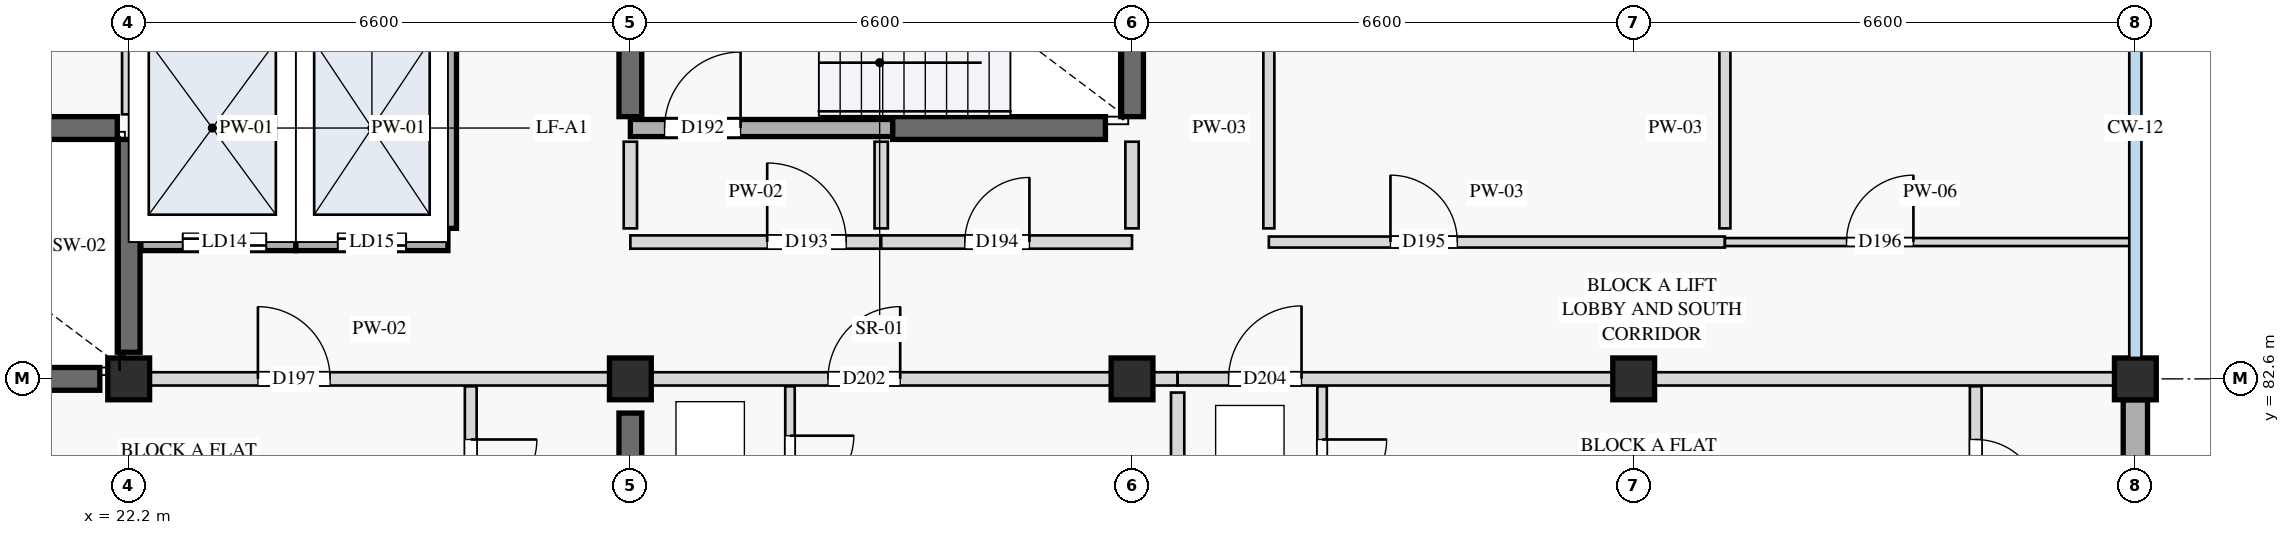
"""IFC4 building model, lengths in metres.
Left out: names, types, materials, properties, quantities, classifications, styles, units other than length and angle.
Written with IfcOpenShell. Run it as: python <this file> out.ifc"""

import sys

from ifc_helpers import new_model, si_unit, direction, frame, frame_2d, origin, origin_2d, place, context, subcontext, project, spatial, rectangle, extrude, element, fill, save


model = new_model("IFC4")
c1 = context("Model", 3, precision=1e-05, world=origin(), true_north=direction((0.0, 1.0)))
c2 = subcontext(c1, "Body", "Model", "MODEL_VIEW")
j1 = project(units=[si_unit("LENGTHUNIT", "METRE"), si_unit("PLANEANGLEUNIT", "RADIAN")], contexts=[c1])
p1 = place(None, origin())
s1 = spatial("IfcSite", under=j1, at=p1, CompositionType="ELEMENT")
p2 = place(p1, origin())
s2 = spatial("IfcBuilding", under=s1, at=p2, CompositionType="ELEMENT")
p3 = place(p2, frame((0.0, 0.0, 21.2)))
s3 = spatial("IfcBuildingStorey", under=s2, at=p3, CompositionType="ELEMENT", Elevation=21.2)
for number, where, z_axis, x_axis in (
    (1, (22.2, 82.6, 0.0), (0.0, 0.0, 1.0), (1.0, 0.0, 0.0)),
    (2, (28.8, 82.6, 0.0), (0.0, 0.0, 1.0), (1.0, 0.0, 0.0)),
    (3, (35.4, 82.6, 0.0), (0.0, 0.0, 1.0), (1.0, 0.0, 0.0)),
    (4, (42.0, 82.6, 0.0), (0.0, 0.0, 1.0), (1.0, 0.0, 0.0)),
    (5, (48.6, 82.6, 0.0), (0.0, 0.0, 1.0), (1.0, 0.0, 0.0)),
):
    element("IfcColumn", number, at=place(p3, frame(where, z_axis=z_axis, x_axis=x_axis)), inside=s3, PredefinedType="COLUMN", context=c2, shape_type="SweptSolid", body=[
        extrude(rectangle(XDim=0.55, YDim=0.55, at=origin_2d()), origin(), (0.0, 0.0, 1.0), 3.2),
    ])
p4 = place(p3, frame((15.98, 82.6, 0.0), z_axis=(0.0, 0.0, 1.0), x_axis=(1.0, 0.0, 0.0)))
e6 = element("IfcWall", 6, at=p4, inside=s3, PredefinedType="SHEAR", context=c2, shape_type="SweptSolid", body=[
    extrude(rectangle(XDim=5.84, YDim=0.3, at=frame_2d((2.92, 0.0))), origin(), (0.0, 0.0, 1.0), 2.96),
])
p5 = place(p3, frame((19.35, 85.9, 0.0), z_axis=(0.0, 0.0, 1.0), x_axis=(1.0, 0.0, 0.0)))
e7 = element("IfcWall", 7, at=p5, inside=s3, PredefinedType="SHEAR", context=c2, shape_type="SweptSolid", body=[
    extrude(rectangle(XDim=2.7, YDim=0.3, at=frame_2d((1.35, 0.0))), origin(), (0.0, 0.0, 1.0), 2.96),
])
for number, where, z_axis, x_axis in (
    (8, (22.2, 82.95, 0.0), (0.0, 0.0, 1.0), (0.0, 1.0, 0.0)),
    (9, (32.25, 85.9, 0.0), (0.0, 0.0, 1.0), (1.0, 0.0, 0.0)),
    (10, (28.8, 86.05, 0.0), (0.0, 0.0, 1.0), (0.0, 1.0, 0.0)),
    (11, (35.4, 86.05, 0.0), (0.0, 0.0, 1.0), (0.0, 1.0, 0.0)),
):
    element("IfcWall", number, at=place(p3, frame(where, z_axis=z_axis, x_axis=x_axis)), inside=s3, PredefinedType="SHEAR", context=c2, shape_type="SweptSolid", body=[
        extrude(rectangle(XDim=2.8, YDim=0.3, at=frame_2d((1.4, 0.0))), origin(), (0.0, 0.0, 1.0), 2.96),
    ])
p6 = place(p3, frame((28.8, 76.45, 0.0), z_axis=(0.0, 0.0, 1.0), x_axis=(0.0, 1.0, 0.0)))
e12 = element("IfcWall", 12, at=p6, inside=s3, PredefinedType="SHEAR", context=c2, shape_type="SweptSolid", body=[
    extrude(rectangle(XDim=5.7, YDim=0.3, at=frame_2d((2.85, 0.0))), origin(), (0.0, 0.0, 1.0), 2.96),
])
p7 = place(p3, frame((48.6, 76.275, 0.0), z_axis=(0.0, 0.0, 1.0), x_axis=(0.0, 1.0, 0.0)))
e13 = element("IfcWall", 13, at=p7, inside=s3, PredefinedType="STANDARD", context=c2, shape_type="SweptSolid", body=[
    extrude(rectangle(XDim=6.05, YDim=0.32, at=frame_2d((3.025, 0.0))), origin(), (0.0, 0.0, 1.0), 2.65),
])
p8 = place(p3, frame((22.2, 86.08, 0.0), z_axis=(0.0, 0.0, 1.0), x_axis=(0.0, 1.0, 0.0)))
e14 = element("IfcWall", 14, at=p8, inside=s3, PredefinedType="PARTITIONING", context=c2, shape_type="SweptSolid", body=[
    extrude(rectangle(XDim=1.19, YDim=0.175, at=frame_2d((0.595, 0.0))), origin(), (0.0, 0.0, 1.0), 2.96),
])
p9 = place(p3, frame((22.36, 84.4, 0.0), z_axis=(0.0, 0.0, 1.0), x_axis=(1.0, 0.0, 0.0)))
e15 = element("IfcWall", 15, at=p9, inside=s3, PredefinedType="STANDARD", context=c2, shape_type="SweptSolid", body=[
    extrude(rectangle(XDim=2.04, YDim=0.225, at=frame_2d((1.02, 0.0))), origin(), (0.0, 0.0, 1.0), 2.96),
])
p10 = place(p9, frame((0.55, 0.0, 0.0)))
e16 = element("IfcOpeningElement", 16, at=p10, cuts=e15, PredefinedType="OPENING", context=c2, shape_type="SweptSolid", body=[
    extrude(rectangle(XDim=1.1, YDim=2.1, at=frame_2d((0.55, 1.05))), frame((0.0, 0.123, 0.0), z_axis=(0.0, -1.0, 0.0), x_axis=(1.0, 0.0, 0.0)), (0.0, 0.0, 1.0), 0.245),
])
p11 = place(p3, frame((24.4, 84.4, 0.0), z_axis=(0.0, 0.0, 1.0), x_axis=(1.0, 0.0, 0.0)))
e17 = element("IfcWall", 17, at=p11, inside=s3, PredefinedType="STANDARD", context=c2, shape_type="SweptSolid", body=[
    extrude(rectangle(XDim=2.0, YDim=0.225, at=frame_2d((1.0, 0.0))), origin(), (0.0, 0.0, 1.0), 2.96),
])
p12 = place(p11, frame((0.55, 0.0, 0.0)))
e18 = element("IfcOpeningElement", 18, at=p12, cuts=e17, PredefinedType="OPENING", context=c2, shape_type="SweptSolid", body=[
    extrude(rectangle(XDim=0.9, YDim=2.1, at=frame_2d((0.45, 1.05))), frame((0.0, 0.123, 0.0), z_axis=(0.0, -1.0, 0.0), x_axis=(1.0, 0.0, 0.0)), (0.0, 0.0, 1.0), 0.245),
])
for number, where, z_axis, x_axis in (
    (19, (24.4, 84.58, 0.0), (0.0, 0.0, 1.0), (0.0, 1.0, 0.0)),
    (20, (26.4, 84.58, 0.0), (0.0, 0.0, 1.0), (0.0, 1.0, 0.0)),
):
    element("IfcWall", number, at=place(p3, frame(where, z_axis=z_axis, x_axis=x_axis)), inside=s3, PredefinedType="STANDARD", context=c2, shape_type="SweptSolid", body=[
        extrude(rectangle(XDim=2.64, YDim=0.225, at=frame_2d((1.32, 0.0))), origin(), (0.0, 0.0, 1.0), 2.96),
    ])
p13 = place(p3, frame((28.8, 85.9, 0.0), z_axis=(0.0, 0.0, 1.0), x_axis=(1.0, 0.0, 0.0)))
e21 = element("IfcWall", 21, at=p13, inside=s3, PredefinedType="STANDARD", context=c2, shape_type="SweptSolid", body=[
    extrude(rectangle(XDim=3.45, YDim=0.225, at=frame_2d((1.725, 0.0))), origin(), (0.0, 0.0, 1.0), 2.96),
])
p14 = place(p13, frame((0.45, 0.0, 0.0)))
e22 = element("IfcOpeningElement", 22, at=p14, cuts=e21, PredefinedType="OPENING", context=c2, shape_type="SweptSolid", body=[
    extrude(rectangle(XDim=1.0, YDim=2.16, at=frame_2d((0.5, 1.08))), frame((0.0, 0.123, 0.0), z_axis=(0.0, -1.0, 0.0), x_axis=(1.0, 0.0, 0.0)), (0.0, 0.0, 1.0), 0.245),
])
p15 = place(p3, frame((28.8, 84.4, 0.0), z_axis=(0.0, 0.0, 1.0), x_axis=(1.0, 0.0, 0.0)))
e23 = element("IfcWall", 23, at=p15, inside=s3, PredefinedType="PARTITIONING", context=c2, shape_type="SweptSolid", body=[
    extrude(rectangle(XDim=3.3, YDim=0.175, at=frame_2d((1.65, 0.0))), origin(), (0.0, 0.0, 1.0), 2.96),
])
p16 = place(p15, frame((1.8, 0.0, 0.0)))
e24 = element("IfcOpeningElement", 24, at=p16, cuts=e23, PredefinedType="OPENING", context=c2, shape_type="SweptSolid", body=[
    extrude(rectangle(XDim=1.04, YDim=2.12, at=frame_2d((0.52, 1.06))), frame((0.0, 0.097, 0.0), z_axis=(0.0, -1.0, 0.0), x_axis=(1.0, 0.0, 0.0)), (0.0, 0.0, 1.0), 0.195),
])
p17 = place(p3, frame((32.1, 84.4, 0.0), z_axis=(0.0, 0.0, 1.0), x_axis=(1.0, 0.0, 0.0)))
e25 = element("IfcWall", 25, at=p17, inside=s3, PredefinedType="PARTITIONING", context=c2, shape_type="SweptSolid", body=[
    extrude(rectangle(XDim=3.3, YDim=0.175, at=frame_2d((1.65, 0.0))), origin(), (0.0, 0.0, 1.0), 2.96),
])
p18 = place(p17, frame((1.1, 0.0, 0.0)))
e26 = element("IfcOpeningElement", 26, at=p18, cuts=e25, PredefinedType="OPENING", context=c2, shape_type="SweptSolid", body=[
    extrude(rectangle(XDim=0.85, YDim=2.0, at=frame_2d((0.425, 1.0))), frame((0.0, 0.097, 0.0), z_axis=(0.0, -1.0, 0.0), x_axis=(1.0, 0.0, 0.0)), (0.0, 0.0, 1.0), 0.195),
])
for number, where, z_axis, x_axis in (
    (27, (28.8, 84.58, 0.0), (0.0, 0.0, 1.0), (0.0, 1.0, 0.0)),
    (28, (32.1, 84.58, 0.0), (0.0, 0.0, 1.0), (0.0, 1.0, 0.0)),
    (29, (35.4, 84.58, 0.0), (0.0, 0.0, 1.0), (0.0, 1.0, 0.0)),
):
    element("IfcWall", number, at=place(p3, frame(where, z_axis=z_axis, x_axis=x_axis)), inside=s3, PredefinedType="PARTITIONING", context=c2, shape_type="SweptSolid", body=[
        extrude(rectangle(XDim=1.14, YDim=0.175, at=frame_2d((0.57, 0.0))), origin(), (0.0, 0.0, 1.0), 2.96),
    ])
p19 = place(p3, frame((37.2, 84.4, 0.0), z_axis=(0.0, 0.0, 1.0), x_axis=(1.0, 0.0, 0.0)))
e30 = element("IfcWall", 30, at=p19, inside=s3, PredefinedType="PARTITIONING", context=c2, shape_type="SweptSolid", body=[
    extrude(rectangle(XDim=6.0, YDim=0.145, at=frame_2d((3.0, 0.0))), origin(), (0.0, 0.0, 1.0), 2.96),
])
p20 = place(p19, frame((1.6, 0.0, 0.0)))
e31 = element("IfcOpeningElement", 31, at=p20, cuts=e30, PredefinedType="OPENING", context=c2, shape_type="SweptSolid", body=[
    extrude(rectangle(XDim=0.88, YDim=2.1, at=frame_2d((0.44, 1.05))), frame((0.0, 0.083, 0.0), z_axis=(0.0, -1.0, 0.0), x_axis=(1.0, 0.0, 0.0)), (0.0, 0.0, 1.0), 0.165),
])
p21 = place(p3, frame((43.2, 84.4, 0.0), z_axis=(0.0, 0.0, 1.0), x_axis=(1.0, 0.0, 0.0)))
e32 = element("IfcWall", 32, at=p21, inside=s3, PredefinedType="PARTITIONING", context=c2, shape_type="SweptSolid", body=[
    extrude(rectangle(XDim=5.4, YDim=0.105, at=frame_2d((2.7, 0.0))), origin(), (0.0, 0.0, 1.0), 2.96),
])
p22 = place(p21, frame((1.6, 0.0, 0.0)))
e33 = element("IfcOpeningElement", 33, at=p22, cuts=e32, PredefinedType="OPENING", context=c2, shape_type="SweptSolid", body=[
    extrude(rectangle(XDim=0.88, YDim=2.16, at=frame_2d((0.44, 1.08))), frame((0.0, 0.062, 0.0), z_axis=(0.0, -1.0, 0.0), x_axis=(1.0, 0.0, 0.0)), (0.0, 0.0, 1.0), 0.125),
])
for number, where, z_axis, x_axis in (
    (34, (43.2, 84.58, 0.0), (0.0, 0.0, 1.0), (0.0, 1.0, 0.0)),
    (35, (37.2, 84.58, 0.0), (0.0, 0.0, 1.0), (0.0, 1.0, 0.0)),
):
    element("IfcWall", number, at=place(p3, frame(where, z_axis=z_axis, x_axis=x_axis)), inside=s3, PredefinedType="PARTITIONING", context=c2, shape_type="SweptSolid", body=[
        extrude(rectangle(XDim=2.64, YDim=0.145, at=frame_2d((1.32, 0.0))), origin(), (0.0, 0.0, 1.0), 2.96),
    ])
p23 = place(p3, frame((22.2, 82.6, 0.0), z_axis=(0.0, 0.0, 1.0), x_axis=(1.0, 0.0, 0.0)))
e36 = element("IfcWall", 36, at=p23, inside=s3, PredefinedType="PARTITIONING", context=c2, shape_type="SweptSolid", body=[
    extrude(rectangle(XDim=6.6, YDim=0.175, at=frame_2d((3.3, 0.0))), origin(), (0.0, 0.0, 1.0), 2.55),
])
p24 = place(p23, frame((1.7, 0.0, 0.0)))
e37 = element("IfcOpeningElement", 37, at=p24, cuts=e36, PredefinedType="OPENING", context=c2, shape_type="SweptSolid", body=[
    extrude(rectangle(XDim=0.95, YDim=2.1, at=frame_2d((0.475, 1.05))), frame((0.0, 0.097, 0.0), z_axis=(0.0, -1.0, 0.0), x_axis=(1.0, 0.0, 0.0)), (0.0, 0.0, 1.0), 0.195),
])
p25 = place(p3, frame((26.7, 82.502, 0.0), z_axis=(0.0, 0.0, 1.0), x_axis=(0.0, -1.0, 0.0)))
e38 = element("IfcWall", 38, at=p25, inside=s3, PredefinedType="PARTITIONING", context=c2, shape_type="SweptSolid", body=[
    extrude(rectangle(XDim=2.302, YDim=0.155, at=frame_2d((1.151, 0.0))), origin(), (0.0, 0.0, 1.0), 2.96),
])
p26 = place(p25, frame((0.7, 0.0, 0.0)))
e39 = element("IfcOpeningElement", 39, at=p26, cuts=e38, PredefinedType="OPENING", context=c2, shape_type="SweptSolid", body=[
    extrude(rectangle(XDim=0.87, YDim=2.08, at=frame_2d((0.435, 1.04))), frame((0.0, 0.087, 0.0), z_axis=(0.0, -1.0, 0.0), x_axis=(1.0, 0.0, 0.0)), (0.0, 0.0, 1.0), 0.175),
])
p27 = place(p3, frame((28.8, 82.6, 0.0), z_axis=(0.0, 0.0, 1.0), x_axis=(1.0, 0.0, 0.0)))
e40 = element("IfcWall", 40, at=p27, inside=s3, PredefinedType="PARTITIONING", context=c2, shape_type="SweptSolid", body=[
    extrude(rectangle(XDim=7.2, YDim=0.175, at=frame_2d((3.6, 0.0))), origin(), (0.0, 0.0, 1.0), 2.55),
])
p28 = place(p27, frame((2.6, 0.0, 0.0)))
e41 = element("IfcOpeningElement", 41, at=p28, cuts=e40, PredefinedType="OPENING", context=c2, shape_type="SweptSolid", body=[
    extrude(rectangle(XDim=0.95, YDim=2.16, at=frame_2d((0.475, 1.08))), frame((0.0, 0.097, 0.0), z_axis=(0.0, -1.0, 0.0), x_axis=(1.0, 0.0, 0.0)), (0.0, 0.0, 1.0), 0.195),
])
p29 = place(p3, frame((30.9, 82.502, 0.0), z_axis=(0.0, 0.0, 1.0), x_axis=(0.0, -1.0, 0.0)))
e42 = element("IfcWall", 42, at=p29, inside=s3, PredefinedType="PARTITIONING", context=c2, shape_type="SweptSolid", body=[
    extrude(rectangle(XDim=2.202, YDim=0.125, at=frame_2d((1.101, 0.0))), origin(), (0.0, 0.0, 1.0), 2.96),
])
p30 = place(p29, frame((0.65, 0.0, 0.0)))
e43 = element("IfcOpeningElement", 43, at=p30, cuts=e42, PredefinedType="OPENING", context=c2, shape_type="SweptSolid", body=[
    extrude(rectangle(XDim=0.84, YDim=2.06, at=frame_2d((0.42, 1.03))), frame((0.0, 0.073, 0.0), z_axis=(0.0, -1.0, 0.0), x_axis=(1.0, 0.0, 0.0)), (0.0, 0.0, 1.0), 0.145),
])
p31 = place(p3, frame((36.0, 82.42, 0.0), z_axis=(0.0, 0.0, 1.0), x_axis=(0.0, -1.0, 0.0)))
e44 = element("IfcWall", 44, at=p31, inside=s3, PredefinedType="PARTITIONING", context=c2, shape_type="SweptSolid", body=[
    extrude(rectangle(XDim=6.19, YDim=0.175, at=frame_2d((3.095, 0.0))), origin(), (0.0, 0.0, 1.0), 2.96),
])
p32 = place(p3, frame((36.0, 82.6, 0.0), z_axis=(0.0, 0.0, 1.0), x_axis=(1.0, 0.0, 0.0)))
e45 = element("IfcWall", 45, at=p32, inside=s3, PredefinedType="PARTITIONING", context=c2, shape_type="SweptSolid", body=[
    extrude(rectangle(XDim=12.6, YDim=0.175, at=frame_2d((6.3, 0.0))), origin(), (0.0, 0.0, 1.0), 2.55),
])
p33 = place(p32, frame((0.67, 0.0, 0.0)))
e46 = element("IfcOpeningElement", 46, at=p33, cuts=e45, PredefinedType="OPENING", context=c2, shape_type="SweptSolid", body=[
    extrude(rectangle(XDim=0.96, YDim=2.18, at=frame_2d((0.48, 1.09))), frame((0.0, 0.097, 0.0), z_axis=(0.0, -1.0, 0.0), x_axis=(1.0, 0.0, 0.0)), (0.0, 0.0, 1.0), 0.195),
])
p34 = place(p3, frame((37.9, 82.502, 0.0), z_axis=(0.0, 0.0, 1.0), x_axis=(0.0, -1.0, 0.0)))
e47 = element("IfcWall", 47, at=p34, inside=s3, PredefinedType="PARTITIONING", context=c2, shape_type="SweptSolid", body=[
    extrude(rectangle(XDim=2.302, YDim=0.125, at=frame_2d((1.151, 0.0))), origin(), (0.0, 0.0, 1.0), 2.96),
])
p35 = place(p34, frame((0.7, 0.0, 0.0)))
e48 = element("IfcOpeningElement", 48, at=p35, cuts=e47, PredefinedType="OPENING", context=c2, shape_type="SweptSolid", body=[
    extrude(rectangle(XDim=0.85, YDim=2.04, at=frame_2d((0.425, 1.02))), frame((0.0, 0.073, 0.0), z_axis=(0.0, -1.0, 0.0), x_axis=(1.0, 0.0, 0.0)), (0.0, 0.0, 1.0), 0.145),
])
p36 = place(p3, frame((46.5, 82.502, 0.0), z_axis=(0.0, 0.0, 1.0), x_axis=(0.0, -1.0, 0.0)))
e49 = element("IfcWall", 49, at=p36, inside=s3, PredefinedType="PARTITIONING", context=c2, shape_type="SweptSolid", body=[
    extrude(rectangle(XDim=2.302, YDim=0.155, at=frame_2d((1.151, 0.0))), origin(), (0.0, 0.0, 1.0), 2.96),
])
p37 = place(p36, frame((0.7, 0.0, 0.0)))
e50 = element("IfcOpeningElement", 50, at=p37, cuts=e49, PredefinedType="OPENING", context=c2, shape_type="SweptSolid", body=[
    extrude(rectangle(XDim=0.86, YDim=2.12, at=frame_2d((0.43, 1.06))), frame((0.0, 0.087, 0.0), z_axis=(0.0, -1.0, 0.0), x_axis=(1.0, 0.0, 0.0)), (0.0, 0.0, 1.0), 0.175),
])
p38 = place(p10, origin())
e51 = element("IfcDoor", 51, at=p38, inside=s3, OperationType="DOUBLE_DOOR_SLIDING", PredefinedType="DOOR", context=c2, shape_type="SweptSolid", body=[
    extrude(rectangle(XDim=1.1, YDim=2.1, at=frame_2d((0.55, 1.05))), frame((0.0, 0.025, 0.0), z_axis=(0.0, -1.0, 0.0), x_axis=(1.0, 0.0, 0.0)), (0.0, 0.0, 1.0), 0.05),
])
fill(e16, e51)
p39 = place(p12, origin())
e52 = element("IfcDoor", 52, at=p39, inside=s3, OperationType="DOUBLE_DOOR_SLIDING", PredefinedType="DOOR", context=c2, shape_type="SweptSolid", body=[
    extrude(rectangle(XDim=0.9, YDim=2.1, at=frame_2d((0.45, 1.05))), frame((0.0, 0.025, 0.0), z_axis=(0.0, -1.0, 0.0), x_axis=(1.0, 0.0, 0.0)), (0.0, 0.0, 1.0), 0.05),
])
fill(e18, e52)
p40 = place(p14, origin())
e53 = element("IfcDoor", 53, at=p40, inside=s3, OperationType="SINGLE_SWING_RIGHT", PredefinedType="DOOR", context=c2, shape_type="SweptSolid", body=[
    extrude(rectangle(XDim=1.0, YDim=2.16, at=frame_2d((0.5, 1.08))), frame((0.0, 0.025, 0.0), z_axis=(0.0, -1.0, 0.0), x_axis=(1.0, 0.0, 0.0)), (0.0, 0.0, 1.0), 0.05),
])
fill(e22, e53)
p41 = place(p16, origin())
e54 = element("IfcDoor", 54, at=p41, inside=s3, OperationType="SINGLE_SWING_LEFT", PredefinedType="DOOR", context=c2, shape_type="SweptSolid", body=[
    extrude(rectangle(XDim=1.04, YDim=2.12, at=frame_2d((0.52, 1.06))), frame((0.0, 0.025, 0.0), z_axis=(0.0, -1.0, 0.0), x_axis=(1.0, 0.0, 0.0)), (0.0, 0.0, 1.0), 0.05),
])
fill(e24, e54)
p42 = place(p18, origin())
e55 = element("IfcDoor", 55, at=p42, inside=s3, OperationType="SINGLE_SWING_RIGHT", PredefinedType="DOOR", context=c2, shape_type="SweptSolid", body=[
    extrude(rectangle(XDim=0.85, YDim=2.0, at=frame_2d((0.425, 1.0))), frame((0.0, 0.025, 0.0), z_axis=(0.0, -1.0, 0.0), x_axis=(1.0, 0.0, 0.0)), (0.0, 0.0, 1.0), 0.05),
])
fill(e26, e55)
p43 = place(p20, origin())
e56 = element("IfcDoor", 56, at=p43, inside=s3, OperationType="SINGLE_SWING_LEFT", PredefinedType="DOOR", context=c2, shape_type="SweptSolid", body=[
    extrude(rectangle(XDim=0.88, YDim=2.1, at=frame_2d((0.44, 1.05))), frame((0.0, 0.025, 0.0), z_axis=(0.0, -1.0, 0.0), x_axis=(1.0, 0.0, 0.0)), (0.0, 0.0, 1.0), 0.05),
])
fill(e31, e56)
p44 = place(p22, origin())
e57 = element("IfcDoor", 57, at=p44, inside=s3, OperationType="SINGLE_SWING_RIGHT", PredefinedType="DOOR", context=c2, shape_type="SweptSolid", body=[
    extrude(rectangle(XDim=0.88, YDim=2.16, at=frame_2d((0.44, 1.08))), frame((0.0, 0.025, 0.0), z_axis=(0.0, -1.0, 0.0), x_axis=(1.0, 0.0, 0.0)), (0.0, 0.0, 1.0), 0.05),
])
fill(e33, e57)
p45 = place(p24, origin())
e58 = element("IfcDoor", 58, at=p45, inside=s3, OperationType="SINGLE_SWING_LEFT", PredefinedType="DOOR", context=c2, shape_type="SweptSolid", body=[
    extrude(rectangle(XDim=0.95, YDim=2.1, at=frame_2d((0.475, 1.05))), frame((0.0, 0.025, 0.0), z_axis=(0.0, -1.0, 0.0), x_axis=(1.0, 0.0, 0.0)), (0.0, 0.0, 1.0), 0.05),
])
fill(e37, e58)
p46 = place(p26, origin())
e59 = element("IfcDoor", 59, at=p46, inside=s3, OperationType="SINGLE_SWING_LEFT", PredefinedType="DOOR", context=c2, shape_type="SweptSolid", body=[
    extrude(rectangle(XDim=0.87, YDim=2.08, at=frame_2d((0.435, 1.04))), frame((0.0, 0.025, 0.0), z_axis=(0.0, -1.0, 0.0), x_axis=(1.0, 0.0, 0.0)), (0.0, 0.0, 1.0), 0.05),
])
fill(e39, e59)
p47 = place(p28, origin())
e60 = element("IfcDoor", 60, at=p47, inside=s3, OperationType="SINGLE_SWING_RIGHT", PredefinedType="DOOR", context=c2, shape_type="SweptSolid", body=[
    extrude(rectangle(XDim=0.95, YDim=2.16, at=frame_2d((0.475, 1.08))), frame((0.0, 0.025, 0.0), z_axis=(0.0, -1.0, 0.0), x_axis=(1.0, 0.0, 0.0)), (0.0, 0.0, 1.0), 0.05),
])
fill(e41, e60)
p48 = place(p30, origin())
e61 = element("IfcDoor", 61, at=p48, inside=s3, OperationType="SINGLE_SWING_LEFT", PredefinedType="DOOR", context=c2, shape_type="SweptSolid", body=[
    extrude(rectangle(XDim=0.84, YDim=2.06, at=frame_2d((0.42, 1.03))), frame((0.0, 0.025, 0.0), z_axis=(0.0, -1.0, 0.0), x_axis=(1.0, 0.0, 0.0)), (0.0, 0.0, 1.0), 0.05),
])
fill(e43, e61)
p49 = place(p33, origin())
e62 = element("IfcDoor", 62, at=p49, inside=s3, OperationType="SINGLE_SWING_RIGHT", PredefinedType="DOOR", context=c2, shape_type="SweptSolid", body=[
    extrude(rectangle(XDim=0.96, YDim=2.18, at=frame_2d((0.48, 1.09))), frame((0.0, 0.025, 0.0), z_axis=(0.0, -1.0, 0.0), x_axis=(1.0, 0.0, 0.0)), (0.0, 0.0, 1.0), 0.05),
])
fill(e46, e62)
p50 = place(p35, origin())
e63 = element("IfcDoor", 63, at=p50, inside=s3, OperationType="SINGLE_SWING_LEFT", PredefinedType="DOOR", context=c2, shape_type="SweptSolid", body=[
    extrude(rectangle(XDim=0.85, YDim=2.04, at=frame_2d((0.425, 1.02))), frame((0.0, 0.025, 0.0), z_axis=(0.0, -1.0, 0.0), x_axis=(1.0, 0.0, 0.0)), (0.0, 0.0, 1.0), 0.05),
])
fill(e48, e63)
p51 = place(p37, origin())
e64 = element("IfcDoor", 64, at=p51, inside=s3, OperationType="SINGLE_SWING_RIGHT", PredefinedType="DOOR", context=c2, shape_type="SweptSolid", body=[
    extrude(rectangle(XDim=0.86, YDim=2.12, at=frame_2d((0.43, 1.06))), frame((0.0, 0.025, 0.0), z_axis=(0.0, -1.0, 0.0), x_axis=(1.0, 0.0, 0.0)), (0.0, 0.0, 1.0), 0.05),
])
fill(e50, e64)
save(model, sys.argv[1])
